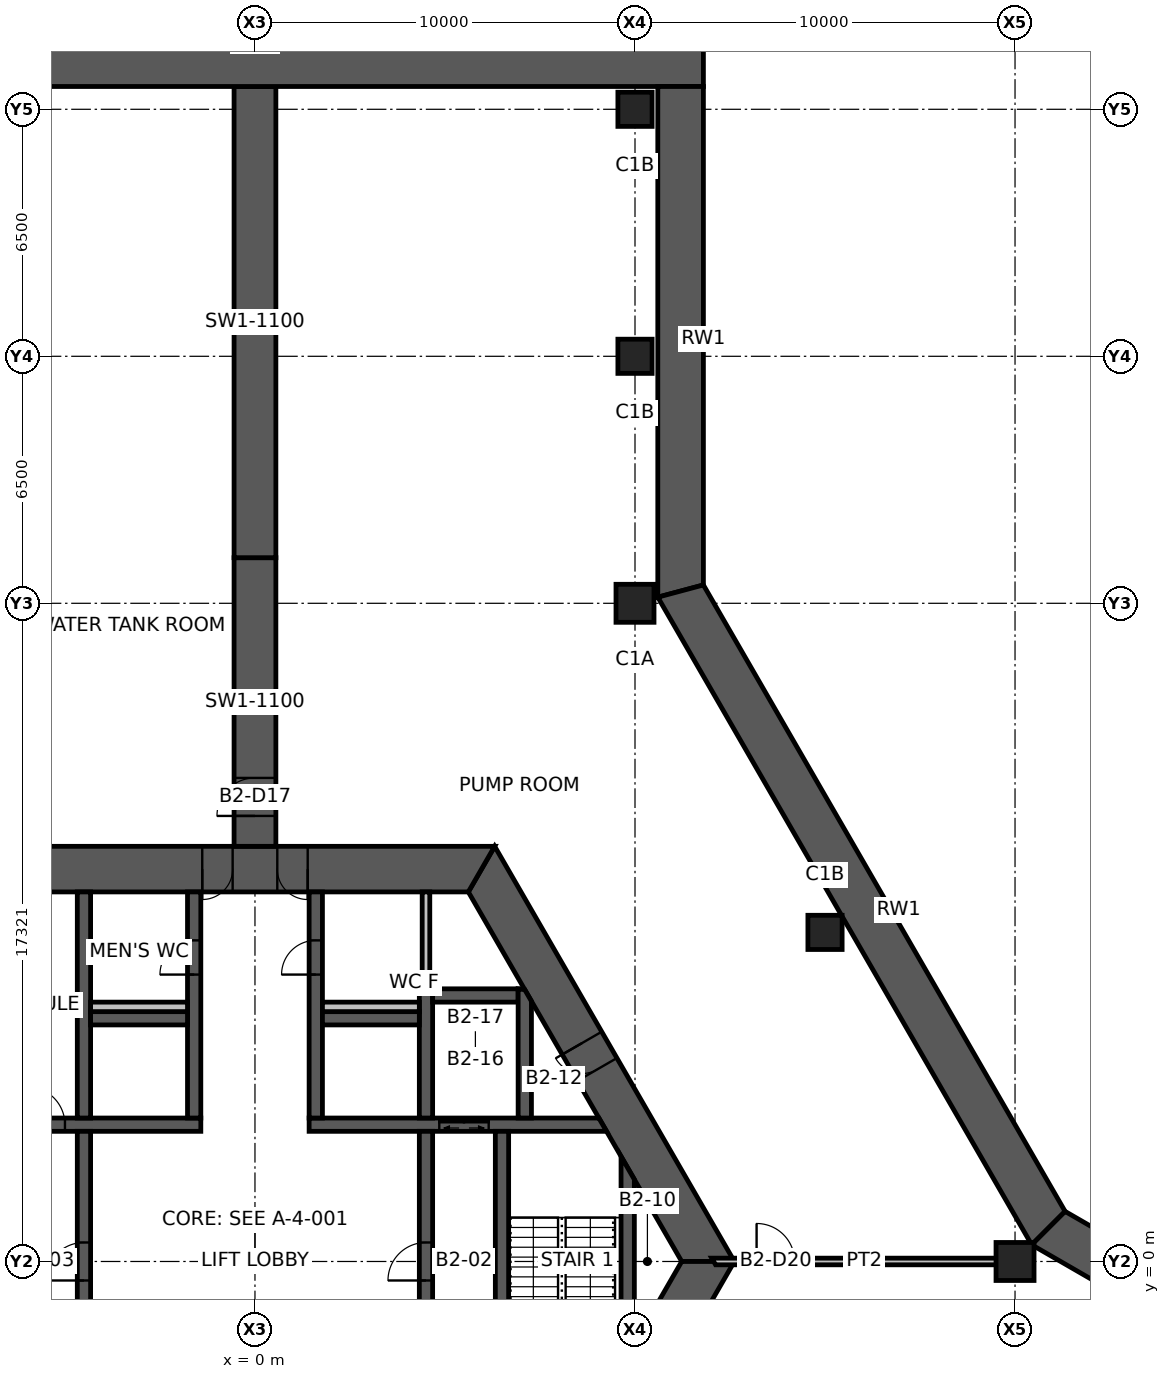
"""IFC4 building model, lengths in metres.
Left out: names, types, materials, properties, quantities, classifications, styles, units other than length and angle.
Written with IfcOpenShell. Run it as: python <this file> out.ifc"""

import sys

from ifc_helpers import new_model, si_unit, direction, frame, frame_2d, origin, origin_2d, place, context, subcontext, project, spatial, polyline, rectangle, hollow_rectangle, outline, extrude, element, fill, save


model = new_model("IFC4")
c1 = context("Model", 3, precision=1e-05, world=origin(), true_north=direction((0.0, 1.0)))
c2 = subcontext(c1, "Body", "Model", "MODEL_VIEW")
j1 = project(units=[si_unit("LENGTHUNIT", "METRE"), si_unit("PLANEANGLEUNIT", "RADIAN")], contexts=[c1])
p1 = place(None, origin())
s1 = spatial("IfcSite", under=j1, at=p1, CompositionType="ELEMENT")
p2 = place(p1, origin())
s2 = spatial("IfcBuilding", under=s1, at=p2, CompositionType="ELEMENT")
p3 = place(p2, frame((0.0, 0.0, -10.0)))
s3 = spatial("IfcBuildingStorey", under=s2, at=p3, CompositionType="ELEMENT", Elevation=-10.0)
for number, where, z_axis, x_axis in (
    (1, (20.0, 0.0, -1.2), (0.0, 0.0, 1.0), (1.0, 0.0, 0.0)),
    (2, (10.0, 17.321, -1.2), (0.0, 0.0, 1.0), (1.0, 0.0, 0.0)),
):
    element("IfcColumn", number, at=place(p3, frame(where, z_axis=z_axis, x_axis=x_axis)), inside=s3, PredefinedType="COLUMN", context=c2, shape_type="SweptSolid", body=[
        extrude(hollow_rectangle(XDim=1.0, YDim=1.0, WallThickness=0.06, at=origin_2d()), origin(), (0.0, 0.0, 1.0), 6.2),
    ])
for number, where, z_axis, x_axis in (
    (3, (15.0, 8.66, -1.2), (0.0, 0.0, 1.0), (1.0, 0.0, 0.0)),
    (4, (10.0, 23.821, -1.2), (0.0, 0.0, 1.0), (1.0, 0.0, 0.0)),
    (5, (10.0, 30.321, -1.2), (0.0, 0.0, 1.0), (1.0, 0.0, 0.0)),
):
    element("IfcColumn", number, at=place(p3, frame(where, z_axis=z_axis, x_axis=x_axis)), inside=s3, PredefinedType="COLUMN", context=c2, shape_type="SweptSolid", body=[
        extrude(hollow_rectangle(XDim=0.9, YDim=0.9, WallThickness=0.05, at=origin_2d()), origin(), (0.0, 0.0, 1.0), 6.2),
    ])
p4 = place(p3, frame((11.922, 0.0, 0.0), z_axis=(0.0, 0.0, 1.0), x_axis=(-0.500004296715, 0.866022923061, 0.0)))
e6 = element("IfcWall", 6, at=p4, inside=s3, PredefinedType="SHEAR", context=c2, shape_type="SweptSolid", body=[
    extrude(outline(polyline([(-0.346, -0.6), (5.835, -0.6), (6.635, -0.6), (12.269, -0.6), (11.576, 0.6), (6.635, 0.6), (5.835, 0.6), (0.346, 0.6), (-0.346, -0.6)])), origin(), (0.0, 0.0, 1.0), 5.0),
])
p5 = place(p4, frame((5.835, 0.0, 0.0)))
e7 = element("IfcOpeningElement", 7, at=p5, cuts=e6, PredefinedType="OPENING", context=c2, shape_type="SweptSolid", body=[
    extrude(rectangle(XDim=0.8, YDim=2.1, at=frame_2d((0.4, 1.05))), frame((0.0, 0.61, 0.0), z_axis=(0.0, -1.0, 0.0), x_axis=(1.0, 0.0, 0.0)), (0.0, 0.0, 1.0), 1.22),
])
p6 = place(p3, frame((5.961, 10.325, 0.0), z_axis=(0.0, 0.0, 1.0), x_axis=(-1.0, 0.0, 0.0)))
e8 = element("IfcWall", 8, at=p6, inside=s3, PredefinedType="SHEAR", context=c2, shape_type="SweptSolid", body=[
    extrude(outline(polyline([(-0.346, -0.6), (4.574, -0.6), (5.374, -0.6), (6.549, -0.6), (7.349, -0.6), (12.269, -0.6), (11.576, 0.6), (7.349, 0.6), (6.549, 0.6), (5.374, 0.6), (4.574, 0.6), (0.346, 0.6), (-0.346, -0.6)])), origin(), (0.0, 0.0, 1.0), 5.0),
])
p7 = place(p6, frame((6.549, 0.0, 0.0)))
e9 = element("IfcOpeningElement", 9, at=p7, cuts=e8, PredefinedType="OPENING", context=c2, shape_type="SweptSolid", body=[
    extrude(rectangle(XDim=0.8, YDim=2.1, at=frame_2d((0.4, 1.05))), frame((0.0, 0.61, 0.0), z_axis=(0.0, -1.0, 0.0), x_axis=(1.0, 0.0, 0.0)), (0.0, 0.0, 1.0), 1.22),
])
p8 = place(p6, frame((4.574, 0.0, 0.0)))
e10 = element("IfcOpeningElement", 10, at=p8, cuts=e8, PredefinedType="OPENING", context=c2, shape_type="SweptSolid", body=[
    extrude(rectangle(XDim=0.8, YDim=2.1, at=frame_2d((0.4, 1.05))), frame((0.0, 0.61, 0.0), z_axis=(0.0, -1.0, 0.0), x_axis=(1.0, 0.0, 0.0)), (0.0, 0.0, 1.0), 1.22),
])
p9 = place(p3, frame((5.961, -10.325, 0.0), z_axis=(0.0, 0.0, 1.0), x_axis=(0.500004296715, 0.866022923061, 0.0)))
e11 = element("IfcWall", 11, at=p9, inside=s3, PredefinedType="SHEAR", context=c2, shape_type="SweptSolid", body=[
    extrude(outline(polyline([(-0.346, -0.6), (3.208, -0.6), (4.009, -0.6), (12.269, -0.6), (11.576, 0.6), (4.009, 0.6), (3.208, 0.6), (0.346, 0.6), (-0.346, -0.6)])), origin(), (0.0, 0.0, 1.0), 5.0),
])
p10 = place(p9, frame((3.208, 0.0, 0.0)))
e12 = element("IfcOpeningElement", 12, at=p10, cuts=e11, PredefinedType="OPENING", context=c2, shape_type="SweptSolid", body=[
    extrude(rectangle(XDim=0.8, YDim=2.1, at=frame_2d((0.4, 1.05))), frame((0.0, 0.61, 0.0), z_axis=(0.0, -1.0, 0.0), x_axis=(1.0, 0.0, 0.0)), (0.0, 0.0, 1.0), 1.22),
])
p11 = place(p3, frame((0.0, 10.925, 0.0), z_axis=(0.0, 0.0, 1.0), x_axis=(0.0, 1.0, 0.0)))
e13 = element("IfcWall", 13, at=p11, inside=s3, PredefinedType="SHEAR", context=c2, shape_type="SweptSolid", body=[
    extrude(rectangle(XDim=7.595, YDim=1.1, at=frame_2d((3.798, 0.0))), origin(), (0.0, 0.0, 1.0), 5.0),
])
p12 = place(p11, frame((0.8, 0.0, 0.0)))
e14 = element("IfcOpeningElement", 14, at=p12, cuts=e13, PredefinedType="OPENING", context=c2, shape_type="SweptSolid", body=[
    extrude(rectangle(XDim=1.0, YDim=2.1, at=frame_2d((0.5, 1.05))), frame((0.0, 0.56, 0.0), z_axis=(0.0, -1.0, 0.0), x_axis=(1.0, 0.0, 0.0)), (0.0, 0.0, 1.0), 1.12),
])
p13 = place(p3, frame((0.0, 18.521, 0.0), z_axis=(0.0, 0.0, 1.0), x_axis=(0.0, 1.0, 0.0)))
e15 = element("IfcWall", 15, at=p13, inside=s3, PredefinedType="SHEAR", context=c2, shape_type="SweptSolid", body=[
    extrude(rectangle(XDim=12.4, YDim=1.1, at=frame_2d((6.2, 0.0))), origin(), (0.0, 0.0, 1.0), 5.0),
])
p14 = place(p3, frame((-11.8, 31.521, 0.0), z_axis=(0.0, 0.0, 1.0), x_axis=(1.0, 0.0, 0.0)))
e16 = element("IfcWall", 16, at=p14, inside=s3, PredefinedType="SOLIDWALL", context=c2, shape_type="SweptSolid", body=[
    extrude(rectangle(XDim=23.6, YDim=1.2, at=frame_2d((11.8, 0.0))), origin(), (0.0, 0.0, 1.0), 5.0),
])
p15 = place(p3, frame((11.2, 30.92, 0.0), z_axis=(0.0, 0.0, 1.0), x_axis=(0.0, -1.0, 0.0)))
e17 = element("IfcWall", 17, at=p15, inside=s3, PredefinedType="SOLIDWALL", context=c2, shape_type="SweptSolid", body=[
    extrude(outline(polyline([(0.0, -0.6), (13.439, -0.6), (13.117, 0.6), (0.0, 0.6), (0.0, -0.6)])), origin(), (0.0, 0.0, 1.0), 5.0),
])
p16 = place(p3, frame((11.2, 17.642, 0.0), z_axis=(0.0, 0.0, 1.0), x_axis=(0.499998307868, -0.866026380735, 0.0)))
e18 = element("IfcWall", 18, at=p16, inside=s3, PredefinedType="SOLIDWALL", context=c2, shape_type="SweptSolid", body=[
    extrude(outline(polyline([(-0.161, -0.6), (19.518, -0.6), (19.196, 0.6), (0.161, 0.6), (-0.161, -0.6)])), origin(), (0.0, 0.0, 1.0), 5.0),
])
p17 = place(p3, frame((20.878, 0.878, 0.0), z_axis=(0.0, 0.0, 1.0), x_axis=(0.866028209229, -0.499995140796, 0.0)))
e19 = element("IfcWall", 19, at=p17, inside=s3, PredefinedType="SOLIDWALL", context=c2, shape_type="SweptSolid", body=[
    extrude(outline(polyline([(-0.161, -0.6), (13.279, -0.6), (13.279, 0.6), (0.161, 0.6), (-0.161, -0.6)])), origin(), (0.0, 0.0, 1.0), 5.0),
])
p18 = place(p3, frame((-9.151, 3.6, 0.0), z_axis=(0.0, 0.0, 1.0), x_axis=(1.0, 0.0, 0.0)))
e20 = element("IfcWall", 20, at=p18, inside=s3, PredefinedType="SHEAR", context=c2, shape_type="SweptSolid", body=[
    extrude(outline(polyline([(-0.101, -0.175), (3.151, -0.175), (4.151, -0.175), (7.726, -0.175), (7.726, 0.175), (4.151, 0.175), (3.151, 0.175), (0.101, 0.175), (-0.101, -0.175)])), origin(), (0.0, 0.0, 1.0), 5.0),
])
p19 = place(p18, frame((3.151, 0.0, 0.0)))
e21 = element("IfcOpeningElement", 21, at=p19, cuts=e20, PredefinedType="OPENING", context=c2, shape_type="SweptSolid", body=[
    extrude(rectangle(XDim=1.0, YDim=2.1, at=frame_2d((0.5, 1.05))), frame((0.0, 0.185, 0.0), z_axis=(0.0, -1.0, 0.0), x_axis=(1.0, 0.0, 0.0)), (0.0, 0.0, 1.0), 0.37),
])
p20 = place(p3, frame((1.425, 3.6, 0.0), z_axis=(0.0, 0.0, 1.0), x_axis=(1.0, 0.0, 0.0)))
e22 = element("IfcWall", 22, at=p20, inside=s3, PredefinedType="SHEAR", context=c2, shape_type="SweptSolid", body=[
    extrude(outline(polyline([(0.0, -0.175), (3.425, -0.175), (4.725, -0.175), (7.827, -0.175), (7.625, 0.175), (4.725, 0.175), (3.425, 0.175), (0.0, 0.175), (0.0, -0.175)])), origin(), (0.0, 0.0, 1.0), 5.0),
])
p21 = place(p20, frame((3.425, 0.0, 0.0)))
e23 = element("IfcOpeningElement", 23, at=p21, cuts=e22, PredefinedType="OPENING", context=c2, shape_type="SweptSolid", body=[
    extrude(rectangle(XDim=1.3, YDim=2.1, at=frame_2d((0.65, 1.05))), frame((0.0, 0.185, 0.0), z_axis=(0.0, -1.0, 0.0), x_axis=(1.0, 0.0, 0.0)), (0.0, 0.0, 1.0), 0.37),
])
p22 = place(p3, frame((-1.6, 3.775, 0.0), z_axis=(0.0, 0.0, 1.0), x_axis=(0.0, 1.0, 0.0)))
e24 = element("IfcWall", 24, at=p22, inside=s3, PredefinedType="SHEAR", context=c2, shape_type="SweptSolid", body=[
    extrude(rectangle(XDim=5.95, YDim=0.35, at=frame_2d((2.975, 0.0))), origin(), (0.0, 0.0, 1.0), 5.0),
])
p23 = place(p22, frame((3.775, 0.0, 0.0)))
e25 = element("IfcOpeningElement", 25, at=p23, cuts=e24, PredefinedType="OPENING", context=c2, shape_type="SweptSolid", body=[
    extrude(rectangle(XDim=0.9, YDim=2.1, at=frame_2d((0.45, 1.05))), frame((0.0, 0.185, 0.0), z_axis=(0.0, -1.0, 0.0), x_axis=(1.0, 0.0, 0.0)), (0.0, 0.0, 1.0), 0.37),
])
p24 = place(p3, frame((1.6, 3.775, 0.0), z_axis=(0.0, 0.0, 1.0), x_axis=(0.0, 1.0, 0.0)))
e26 = element("IfcWall", 26, at=p24, inside=s3, PredefinedType="SHEAR", context=c2, shape_type="SweptSolid", body=[
    extrude(rectangle(XDim=5.95, YDim=0.35, at=frame_2d((2.975, 0.0))), origin(), (0.0, 0.0, 1.0), 5.0),
])
p25 = place(p24, frame((3.775, 0.0, 0.0)))
e27 = element("IfcOpeningElement", 27, at=p25, cuts=e26, PredefinedType="OPENING", context=c2, shape_type="SweptSolid", body=[
    extrude(rectangle(XDim=0.9, YDim=2.1, at=frame_2d((0.45, 1.05))), frame((0.0, 0.185, 0.0), z_axis=(0.0, -1.0, 0.0), x_axis=(1.0, 0.0, 0.0)), (0.0, 0.0, 1.0), 0.37),
])
p26 = place(p3, frame((-4.5, -3.425, 0.0), z_axis=(0.0, 0.0, 1.0), x_axis=(0.0, 1.0, 0.0)))
e28 = element("IfcWall", 28, at=p26, inside=s3, PredefinedType="SHEAR", context=c2, shape_type="SweptSolid", body=[
    extrude(rectangle(XDim=6.85, YDim=0.35, at=frame_2d((3.425, 0.0))), origin(), (0.0, 0.0, 1.0), 5.0),
])
p27 = place(p26, frame((2.925, 0.0, 0.0)))
e29 = element("IfcOpeningElement", 29, at=p27, cuts=e28, PredefinedType="OPENING", context=c2, shape_type="SweptSolid", body=[
    extrude(rectangle(XDim=1.0, YDim=2.1, at=frame_2d((0.5, 1.05))), frame((0.0, 0.185, 0.0), z_axis=(0.0, -1.0, 0.0), x_axis=(1.0, 0.0, 0.0)), (0.0, 0.0, 1.0), 0.37),
])
p28 = place(p3, frame((4.5, -3.425, 0.0), z_axis=(0.0, 0.0, 1.0), x_axis=(0.0, 1.0, 0.0)))
e30 = element("IfcWall", 30, at=p28, inside=s3, PredefinedType="SHEAR", context=c2, shape_type="SweptSolid", body=[
    extrude(rectangle(XDim=6.85, YDim=0.35, at=frame_2d((3.425, 0.0))), origin(), (0.0, 0.0, 1.0), 5.0),
])
p29 = place(p28, frame((2.925, 0.0, 0.0)))
e31 = element("IfcOpeningElement", 31, at=p29, cuts=e30, PredefinedType="OPENING", context=c2, shape_type="SweptSolid", body=[
    extrude(rectangle(XDim=1.0, YDim=2.1, at=frame_2d((0.5, 1.05))), frame((0.0, 0.185, 0.0), z_axis=(0.0, -1.0, 0.0), x_axis=(1.0, 0.0, 0.0)), (0.0, 0.0, 1.0), 0.37),
])
p30 = place(p3, frame((6.5, -3.425, 0.0), z_axis=(0.0, 0.0, 1.0), x_axis=(0.0, 1.0, 0.0)))
e32 = element("IfcWall", 32, at=p30, inside=s3, PredefinedType="SHEAR", context=c2, shape_type="SweptSolid", body=[
    extrude(rectangle(XDim=6.85, YDim=0.35, at=frame_2d((3.425, 0.0))), origin(), (0.0, 0.0, 1.0), 5.0),
])
p31 = place(p30, frame((0.1, 0.0, 0.0)))
e33 = element("IfcOpeningElement", 33, at=p31, cuts=e32, PredefinedType="OPENING", context=c2, shape_type="SweptSolid", body=[
    extrude(rectangle(XDim=1.0, YDim=2.1, at=frame_2d((0.5, 1.05))), frame((0.0, 0.185, 0.0), z_axis=(0.0, -1.0, 0.0), x_axis=(1.0, 0.0, 0.0)), (0.0, 0.0, 1.0), 0.37),
])
p32 = place(p3, frame((-4.5, 3.775, 0.0), z_axis=(0.0, 0.0, 1.0), x_axis=(0.0, 1.0, 0.0)))
e34 = element("IfcWall", 34, at=p32, inside=s3, PredefinedType="SHEAR", context=c2, shape_type="SweptSolid", body=[
    extrude(rectangle(XDim=5.95, YDim=0.35, at=frame_2d((2.975, 0.0))), origin(), (0.0, 0.0, 1.0), 5.0),
])
p33 = place(p3, frame((4.5, 3.775, 0.0), z_axis=(0.0, 0.0, 1.0), x_axis=(0.0, 1.0, 0.0)))
e35 = element("IfcWall", 35, at=p33, inside=s3, PredefinedType="SHEAR", context=c2, shape_type="SweptSolid", body=[
    extrude(rectangle(XDim=3.4, YDim=0.35, at=frame_2d((1.7, 0.0))), origin(), (0.0, 0.0, 1.0), 5.0),
])
for number, where, z_axis, x_axis in (
    (36, (-4.325, 6.4, 0.0), (0.0, 0.0, 1.0), (1.0, 0.0, 0.0)),
    (37, (1.775, 6.4, 0.0), (0.0, 0.0, 1.0), (1.0, 0.0, 0.0)),
):
    element("IfcWall", number, at=place(p3, frame(where, z_axis=z_axis, x_axis=x_axis)), inside=s3, PredefinedType="SHEAR", context=c2, shape_type="SweptSolid", body=[
        extrude(rectangle(XDim=2.55, YDim=0.35, at=frame_2d((1.275, 0.0))), origin(), (0.0, 0.0, 1.0), 5.0),
    ])
p34 = place(p3, frame((4.675, 7.0, 0.0), z_axis=(0.0, 0.0, 1.0), x_axis=(1.0, 0.0, 0.0)))
e38 = element("IfcWall", 38, at=p34, inside=s3, PredefinedType="SHEAR", context=c2, shape_type="SweptSolid", body=[
    extrude(rectangle(XDim=2.25, YDim=0.35, at=frame_2d((1.125, 0.0))), origin(), (0.0, 0.0, 1.0), 5.0),
])
p35 = place(p3, frame((7.1, 3.775, 0.0), z_axis=(0.0, 0.0, 1.0), x_axis=(0.0, 1.0, 0.0)))
e39 = element("IfcWall", 39, at=p35, inside=s3, PredefinedType="SHEAR", context=c2, shape_type="SweptSolid", body=[
    extrude(outline(polyline([(0.0, -0.175), (3.074, -0.175), (3.377, 0.0), (3.4, 0.175), (0.0, 0.175), (0.0, -0.175)])), origin(), (0.0, 0.0, 1.0), 5.0),
])
p36 = place(p3, frame((9.808, -2.462, 0.0), z_axis=(0.0, 0.0, 1.0), x_axis=(0.0, 1.0, 0.0)))
e40 = element("IfcWall", 40, at=p36, inside=s3, PredefinedType="SHEAR", context=c2, shape_type="SweptSolid", body=[
    extrude(outline(polyline([(0.303, -0.175), (4.621, -0.175), (5.228, 0.175), (-0.303, 0.175), (0.303, -0.175)])), origin(), (0.0, 0.0, 1.0), 5.0),
])
p37 = place(p3, frame((4.5, 7.175, 0.0), z_axis=(0.0, 0.0, 1.0), x_axis=(0.0, 1.0, 0.0)))
e41 = element("IfcWall", 41, at=p37, inside=s3, PredefinedType="STANDARD", context=c2, shape_type="SweptSolid", body=[
    extrude(rectangle(XDim=2.55, YDim=0.2, at=frame_2d((1.275, 0.0))), origin(), (0.0, 0.0, 1.0), 5.0),
])
for number, where, z_axis, x_axis in (
    (42, (-4.325, 6.7, 0.0), (0.0, 0.0, 1.0), (1.0, 0.0, 0.0)),
    (43, (1.775, 6.7, 0.0), (0.0, 0.0, 1.0), (1.0, 0.0, 0.0)),
):
    element("IfcWall", number, at=place(p3, frame(where, z_axis=z_axis, x_axis=x_axis)), inside=s3, PredefinedType="PLUMBINGWALL", context=c2, shape_type="SweptSolid", body=[
        extrude(rectangle(XDim=2.55, YDim=0.25, at=frame_2d((1.275, 0.0))), origin(), (0.0, 0.0, 1.0), 5.0),
    ])
p38 = place(p3, frame((12.07, 0.0, 0.0), z_axis=(0.0, 0.0, 1.0), x_axis=(1.0, 0.0, 0.0)))
e44 = element("IfcWall", 44, at=p38, inside=s3, PredefinedType="PARTITIONING", context=c2, shape_type="SweptSolid", body=[
    extrude(outline(polyline([(0.051, -0.087), (1.129, -0.087), (2.129, -0.087), (7.93, -0.087), (7.93, 0.087), (2.129, 0.087), (1.129, 0.087), (-0.051, 0.087), (0.051, -0.087)])), origin(), (0.0, 0.0, 1.0), 3.85),
])
p39 = place(p38, frame((1.129, 0.0, 0.0)))
e45 = element("IfcOpeningElement", 45, at=p39, cuts=e44, PredefinedType="OPENING", context=c2, shape_type="SweptSolid", body=[
    extrude(rectangle(XDim=1.0, YDim=2.1, at=frame_2d((0.5, 1.05))), frame((0.0, 0.098, 0.0), z_axis=(0.0, -1.0, 0.0), x_axis=(1.0, 0.0, 0.0)), (0.0, 0.0, 1.0), 0.195),
])
p40 = place(p7, origin())
e46 = element("IfcDoor", 46, at=p40, inside=s3, OperationType="SINGLE_SWING_RIGHT", PredefinedType="DOOR", context=c2, shape_type="SweptSolid", body=[
    extrude(rectangle(XDim=0.8, YDim=2.1, at=frame_2d((0.4, 1.05))), frame((0.0, 0.025, 0.0), z_axis=(0.0, -1.0, 0.0), x_axis=(1.0, 0.0, 0.0)), (0.0, 0.0, 1.0), 0.05),
])
fill(e9, e46)
p41 = place(p8, origin())
e47 = element("IfcDoor", 47, at=p41, inside=s3, OperationType="SINGLE_SWING_LEFT", PredefinedType="DOOR", context=c2, shape_type="SweptSolid", body=[
    extrude(rectangle(XDim=0.8, YDim=2.1, at=frame_2d((0.4, 1.05))), frame((0.0, 0.025, 0.0), z_axis=(0.0, -1.0, 0.0), x_axis=(1.0, 0.0, 0.0)), (0.0, 0.0, 1.0), 0.05),
])
fill(e10, e47)
p42 = place(p5, origin())
e48 = element("IfcDoor", 48, at=p42, inside=s3, OperationType="SINGLE_SWING_RIGHT", PredefinedType="DOOR", context=c2, shape_type="SweptSolid", body=[
    extrude(rectangle(XDim=0.8, YDim=2.1, at=frame_2d((0.4, 1.05))), frame((0.0, 0.025, 0.0), z_axis=(0.0, -1.0, 0.0), x_axis=(1.0, 0.0, 0.0)), (0.0, 0.0, 1.0), 0.05),
])
fill(e7, e48)
p43 = place(p29, origin())
e49 = element("IfcDoor", 49, at=p43, inside=s3, OperationType="SINGLE_SWING_LEFT", PredefinedType="DOOR", context=c2, shape_type="SweptSolid", body=[
    extrude(rectangle(XDim=1.0, YDim=2.1, at=frame_2d((0.5, 1.05))), frame((0.0, 0.025, 0.0), z_axis=(0.0, -1.0, 0.0), x_axis=(1.0, 0.0, 0.0)), (0.0, 0.0, 1.0), 0.05),
])
fill(e31, e49)
p44 = place(p27, origin())
e50 = element("IfcDoor", 50, at=p44, inside=s3, OperationType="SINGLE_SWING_LEFT", PredefinedType="DOOR", context=c2, shape_type="SweptSolid", body=[
    extrude(rectangle(XDim=1.0, YDim=2.1, at=frame_2d((0.5, 1.05))), frame((0.0, 0.025, 0.0), z_axis=(0.0, -1.0, 0.0), x_axis=(1.0, 0.0, 0.0)), (0.0, 0.0, 1.0), 0.05),
])
fill(e29, e50)
p45 = place(p19, origin())
e51 = element("IfcDoor", 51, at=p45, inside=s3, OperationType="SINGLE_SWING_LEFT", PredefinedType="DOOR", context=c2, shape_type="SweptSolid", body=[
    extrude(rectangle(XDim=1.0, YDim=2.1, at=frame_2d((0.5, 1.05))), frame((0.0, 0.025, 0.0), z_axis=(0.0, -1.0, 0.0), x_axis=(1.0, 0.0, 0.0)), (0.0, 0.0, 1.0), 0.05),
])
fill(e21, e51)
p46 = place(p23, origin())
e52 = element("IfcDoor", 52, at=p46, inside=s3, OperationType="SINGLE_SWING_LEFT", PredefinedType="DOOR", context=c2, shape_type="SweptSolid", body=[
    extrude(rectangle(XDim=0.9, YDim=2.1, at=frame_2d((0.45, 1.05))), frame((0.0, 0.025, 0.0), z_axis=(0.0, -1.0, 0.0), x_axis=(1.0, 0.0, 0.0)), (0.0, 0.0, 1.0), 0.05),
])
fill(e25, e52)
p47 = place(p25, origin())
e53 = element("IfcDoor", 53, at=p47, inside=s3, OperationType="SINGLE_SWING_LEFT", PredefinedType="DOOR", context=c2, shape_type="SweptSolid", body=[
    extrude(rectangle(XDim=0.9, YDim=2.1, at=frame_2d((0.45, 1.05))), frame((0.0, 0.025, 0.0), z_axis=(0.0, -1.0, 0.0), x_axis=(1.0, 0.0, 0.0)), (0.0, 0.0, 1.0), 0.05),
])
fill(e27, e53)
p48 = place(p12, origin())
e54 = element("IfcDoor", 54, at=p48, inside=s3, OperationType="SINGLE_SWING_LEFT", PredefinedType="DOOR", context=c2, shape_type="SweptSolid", body=[
    extrude(rectangle(XDim=1.0, YDim=2.1, at=frame_2d((0.5, 1.05))), frame((0.0, 0.025, 0.0), z_axis=(0.0, -1.0, 0.0), x_axis=(1.0, 0.0, 0.0)), (0.0, 0.0, 1.0), 0.05),
])
fill(e14, e54)
p49 = place(p39, origin())
e55 = element("IfcDoor", 55, at=p49, inside=s3, OperationType="SINGLE_SWING_LEFT", PredefinedType="DOOR", context=c2, shape_type="SweptSolid", body=[
    extrude(rectangle(XDim=1.0, YDim=2.1, at=frame_2d((0.5, 1.05))), frame((0.0, 0.025, 0.0), z_axis=(0.0, -1.0, 0.0), x_axis=(1.0, 0.0, 0.0)), (0.0, 0.0, 1.0), 0.05),
])
fill(e45, e55)
p50 = place(p21, origin())
e56 = element("IfcDoor", 56, at=p50, inside=s3, OperationType="DOUBLE_DOOR_SLIDING", PredefinedType="DOOR", context=c2, shape_type="SweptSolid", body=[
    extrude(rectangle(XDim=1.3, YDim=2.1, at=frame_2d((0.65, 1.05))), frame((0.0, 0.025, 0.0), z_axis=(0.0, -1.0, 0.0), x_axis=(1.0, 0.0, 0.0)), (0.0, 0.0, 1.0), 0.05),
])
fill(e23, e56)
save(model, sys.argv[1])
